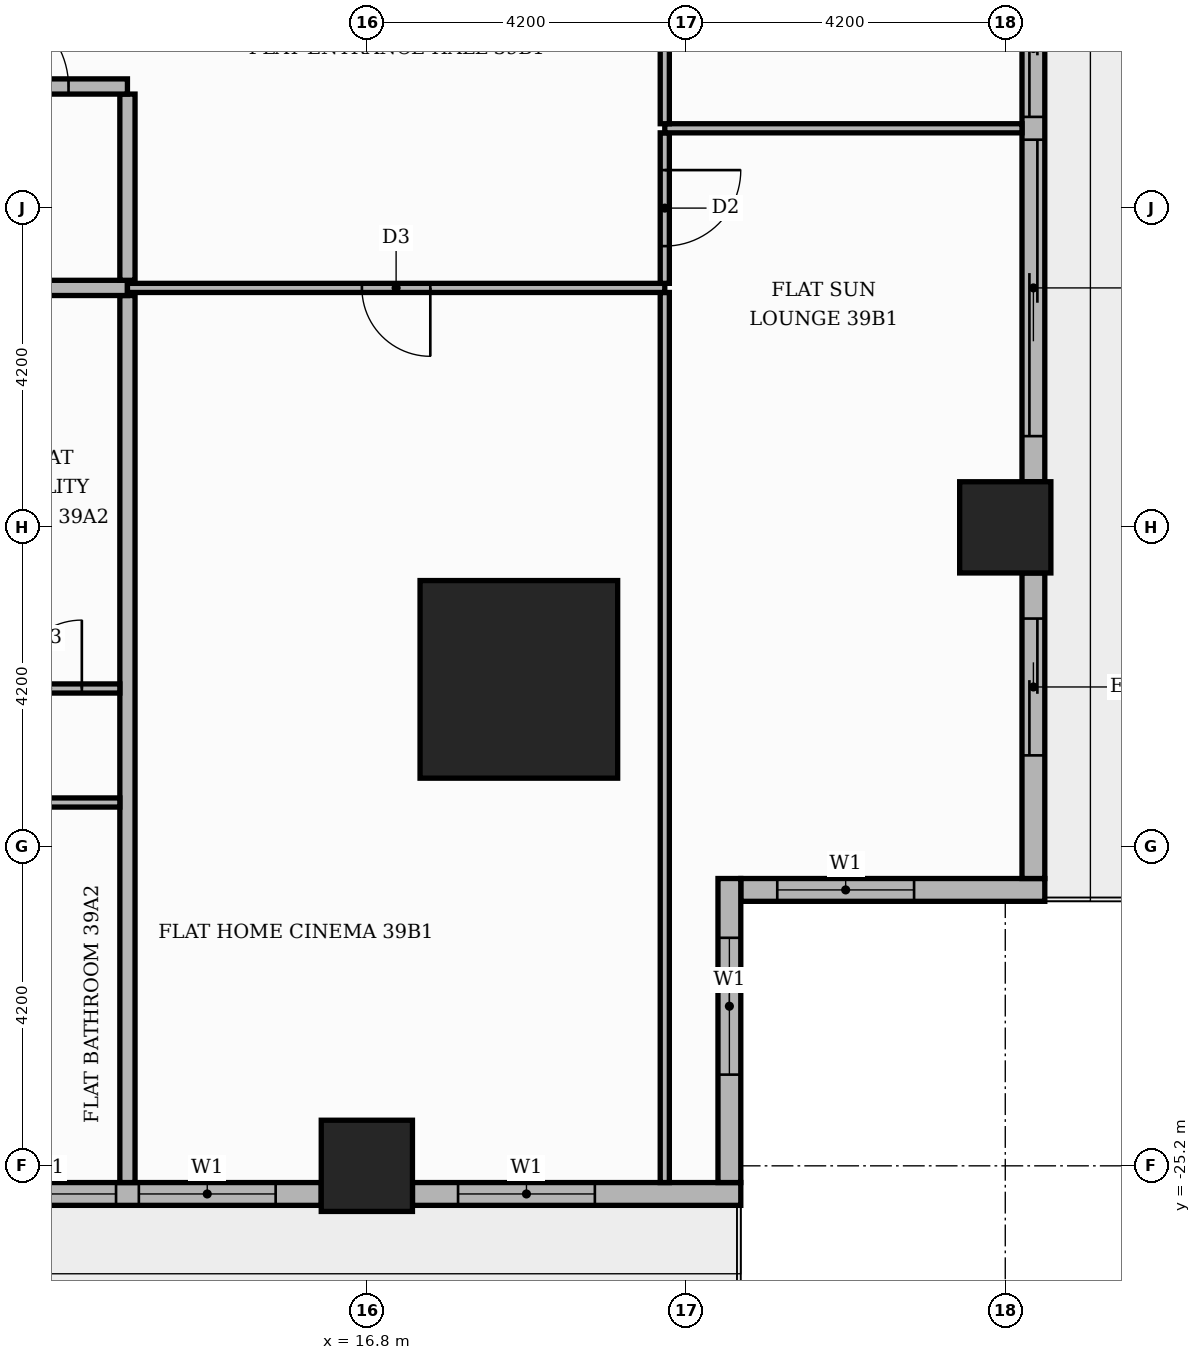
"""IFC4 building model, lengths in metres.
Left out: names, types, materials, properties, quantities, classifications, styles, units other than length and angle.
Written with IfcOpenShell. Run it as: python <this file> out.ifc"""

import sys

from ifc_helpers import new_model, si_unit, direction, frame, frame_2d, origin, origin_2d, place, context, subcontext, project, spatial, rectangle, extrude, element, fill, save


model = new_model("IFC4")
c1 = context("Model", 3, precision=1e-05, world=origin(), true_north=direction((0.0, 1.0)))
c2 = subcontext(c1, "Body", "Model", "MODEL_VIEW")
j1 = project(units=[si_unit("LENGTHUNIT", "METRE"), si_unit("PLANEANGLEUNIT", "RADIAN")], contexts=[c1])
p1 = place(None, origin())
s1 = spatial("IfcSite", under=j1, at=p1, CompositionType="ELEMENT")
p2 = place(p1, origin())
s2 = spatial("IfcBuilding", under=s1, at=p2, CompositionType="ELEMENT")
p3 = place(p2, frame((0.0, 0.0, 165.0)))
s3 = spatial("IfcBuildingStorey", under=s2, at=p3, CompositionType="ELEMENT", Elevation=165.0)
p4 = place(p3, frame((18.8, -18.8, 0.0), z_axis=(0.0, 0.0, 1.0), x_axis=(1.0, 0.0, 0.0)))
e1 = element("IfcColumn", 1, at=p4, inside=s3, PredefinedType="COLUMN", context=c2, shape_type="SweptSolid", body=[
    extrude(rectangle(XDim=2.6, YDim=2.6, at=origin_2d()), origin(), (0.0, 0.0, 1.0), 3.9),
])
for number, where, z_axis, x_axis in (
    (2, (25.2, -16.8, 0.0), (0.0, 0.0, 1.0), (1.0, 0.0, 0.0)),
    (3, (16.8, -25.2, 0.0), (0.0, 0.0, 1.0), (1.0, 0.0, 0.0)),
):
    element("IfcColumn", number, at=place(p3, frame(where, z_axis=z_axis, x_axis=x_axis)), inside=s3, PredefinedType="COLUMN", context=c2, shape_type="SweptSolid", body=[
        extrude(rectangle(XDim=1.2, YDim=1.2, at=origin_2d()), origin(), (0.0, 0.0, 1.0), 3.9),
    ])
p5 = place(p3, frame((21.72, -21.57, 0.0), z_axis=(0.0, 0.0, 1.0), x_axis=(1.0, 0.0, 0.0)))
e4 = element("IfcWall", 4, at=p5, inside=s3, PredefinedType="STANDARD", context=c2, shape_type="SweptSolid", body=[
    extrude(rectangle(XDim=4.0, YDim=0.3, at=frame_2d((2.0, 0.0))), origin(), (0.0, 0.0, 1.0), 3.48),
])
p6 = place(p5, frame((0.48, 0.0, 0.9)))
e5 = element("IfcOpeningElement", 5, at=p6, cuts=e4, PredefinedType="OPENING", context=c2, shape_type="SweptSolid", body=[
    extrude(rectangle(XDim=1.8, YDim=2.1, at=frame_2d((0.9, 1.05))), frame((0.0, 0.16, 0.0), z_axis=(0.0, -1.0, 0.0), x_axis=(1.0, 0.0, 0.0)), (0.0, 0.0, 1.0), 0.32),
])
p7 = place(p3, frame((25.57, -21.42, 0.0), z_axis=(0.0, 0.0, 1.0), x_axis=(0.0, 1.0, 0.0)))
e6 = element("IfcWall", 6, at=p7, inside=s3, PredefinedType="STANDARD", context=c2, shape_type="SweptSolid", body=[
    extrude(rectangle(XDim=4.02, YDim=0.3, at=frame_2d((2.01, 0.0))), origin(), (0.0, 0.0, 1.0), 3.48),
])
p8 = place(p7, frame((1.62, 0.0, 0.0)))
e7 = element("IfcOpeningElement", 7, at=p8, cuts=e6, PredefinedType="OPENING", context=c2, shape_type="SweptSolid", body=[
    extrude(rectangle(XDim=1.8, YDim=2.4, at=frame_2d((0.9, 1.2))), frame((0.0, 0.16, 0.0), z_axis=(0.0, -1.0, 0.0), x_axis=(1.0, 0.0, 0.0)), (0.0, 0.0, 1.0), 0.32),
])
p9 = place(p3, frame((25.57, -16.2, 0.0), z_axis=(0.0, 0.0, 1.0), x_axis=(0.0, 1.0, 0.0)))
e8 = element("IfcWall", 8, at=p9, inside=s3, PredefinedType="STANDARD", context=c2, shape_type="SweptSolid", body=[
    extrude(rectangle(XDim=7.2, YDim=0.3, at=frame_2d((3.6, 0.0))), origin(), (0.0, 0.0, 1.0), 3.48),
])
p10 = place(p9, frame((0.6, 0.0, 0.0)))
e9 = element("IfcOpeningElement", 9, at=p10, cuts=e8, PredefinedType="OPENING", context=c2, shape_type="SweptSolid", body=[
    extrude(rectangle(XDim=3.9, YDim=2.4, at=frame_2d((1.95, 1.2))), frame((0.0, 0.16, 0.0), z_axis=(0.0, -1.0, 0.0), x_axis=(1.0, 0.0, 0.0)), (0.0, 0.0, 1.0), 0.32),
])
p11 = place(p9, frame((4.8, 0.0, 0.0)))
e10 = element("IfcOpeningElement", 10, at=p11, cuts=e8, PredefinedType="OPENING", context=c2, shape_type="SweptSolid", body=[
    extrude(rectangle(XDim=1.8, YDim=2.4, at=frame_2d((0.9, 1.2))), frame((0.0, 0.16, 0.0), z_axis=(0.0, -1.0, 0.0), x_axis=(1.0, 0.0, 0.0)), (0.0, 0.0, 1.0), 0.32),
])
p12 = place(p3, frame((9.0, -25.57, 0.0), z_axis=(0.0, 0.0, 1.0), x_axis=(1.0, 0.0, 0.0)))
e11 = element("IfcWall", 11, at=p12, inside=s3, PredefinedType="STANDARD", context=c2, shape_type="SweptSolid", body=[
    extrude(rectangle(XDim=7.2, YDim=0.3, at=frame_2d((3.6, 0.0))), origin(), (0.0, 0.0, 1.0), 3.48),
])
p13 = place(p12, frame((0.6, 0.0, 0.9)))
e12 = element("IfcOpeningElement", 12, at=p13, cuts=e11, PredefinedType="OPENING", context=c2, shape_type="SweptSolid", body=[
    extrude(rectangle(XDim=1.8, YDim=2.1, at=frame_2d((0.9, 1.05))), frame((0.0, 0.16, 0.0), z_axis=(0.0, -1.0, 0.0), x_axis=(1.0, 0.0, 0.0)), (0.0, 0.0, 1.0), 0.32),
])
p14 = place(p12, frame((2.7, 0.0, 0.9)))
e13 = element("IfcOpeningElement", 13, at=p14, cuts=e11, PredefinedType="OPENING", context=c2, shape_type="SweptSolid", body=[
    extrude(rectangle(XDim=1.8, YDim=2.1, at=frame_2d((0.9, 1.05))), frame((0.0, 0.16, 0.0), z_axis=(0.0, -1.0, 0.0), x_axis=(1.0, 0.0, 0.0)), (0.0, 0.0, 1.0), 0.32),
])
p15 = place(p12, frame((4.8, 0.0, 0.9)))
e14 = element("IfcOpeningElement", 14, at=p15, cuts=e11, PredefinedType="OPENING", context=c2, shape_type="SweptSolid", body=[
    extrude(rectangle(XDim=1.8, YDim=2.1, at=frame_2d((0.9, 1.05))), frame((0.0, 0.16, 0.0), z_axis=(0.0, -1.0, 0.0), x_axis=(1.0, 0.0, 0.0)), (0.0, 0.0, 1.0), 0.32),
])
p16 = place(p3, frame((17.4, -25.57, 0.0), z_axis=(0.0, 0.0, 1.0), x_axis=(1.0, 0.0, 0.0)))
e15 = element("IfcWall", 15, at=p16, inside=s3, PredefinedType="STANDARD", context=c2, shape_type="SweptSolid", body=[
    extrude(rectangle(XDim=4.32, YDim=0.3, at=frame_2d((2.16, 0.0))), origin(), (0.0, 0.0, 1.0), 3.48),
])
p17 = place(p16, frame((0.6, 0.0, 0.9)))
e16 = element("IfcOpeningElement", 16, at=p17, cuts=e15, PredefinedType="OPENING", context=c2, shape_type="SweptSolid", body=[
    extrude(rectangle(XDim=1.8, YDim=2.1, at=frame_2d((0.9, 1.05))), frame((0.0, 0.16, 0.0), z_axis=(0.0, -1.0, 0.0), x_axis=(1.0, 0.0, 0.0)), (0.0, 0.0, 1.0), 0.32),
])
p18 = place(p3, frame((21.57, -25.42, 0.0), z_axis=(0.0, 0.0, 1.0), x_axis=(0.0, 1.0, 0.0)))
e17 = element("IfcWall", 17, at=p18, inside=s3, PredefinedType="STANDARD", context=c2, shape_type="SweptSolid", body=[
    extrude(rectangle(XDim=4.0, YDim=0.3, at=frame_2d((2.0, 0.0))), origin(), (0.0, 0.0, 1.0), 3.48),
])
p19 = place(p18, frame((1.42, 0.0, 0.9)))
e18 = element("IfcOpeningElement", 18, at=p19, cuts=e17, PredefinedType="OPENING", context=c2, shape_type="SweptSolid", body=[
    extrude(rectangle(XDim=1.8, YDim=2.1, at=frame_2d((0.9, 1.05))), frame((0.0, 0.16, 0.0), z_axis=(0.0, -1.0, 0.0), x_axis=(1.0, 0.0, 0.0)), (0.0, 0.0, 1.0), 0.32),
])
p20 = place(p3, frame((13.65, -25.42, 0.0), z_axis=(0.0, 0.0, 1.0), x_axis=(0.0, 1.0, 0.0)))
e19 = element("IfcWall", 19, at=p20, inside=s3, PredefinedType="PARTITIONING", context=c2, shape_type="SweptSolid", body=[
    extrude(rectangle(XDim=11.67, YDim=0.2, at=frame_2d((5.835, 0.0))), origin(), (0.0, 0.0, 1.0), 3.48),
])
p21 = place(p3, frame((20.72, -25.42, 0.0), z_axis=(0.0, 0.0, 1.0), x_axis=(0.0, 1.0, 0.0)))
e20 = element("IfcWall", 20, at=p21, inside=s3, PredefinedType="PARTITIONING", context=c2, shape_type="SweptSolid", body=[
    extrude(rectangle(XDim=11.71, YDim=0.12, at=frame_2d((5.855, 0.0))), origin(), (0.0, 0.0, 1.0), 3.48),
])
p22 = place(p3, frame((-5.15, -20.42, 0.0), z_axis=(0.0, 0.0, 1.0), x_axis=(1.0, 0.0, 0.0)))
e21 = element("IfcWall", 21, at=p22, inside=s3, PredefinedType="PARTITIONING", context=c2, shape_type="SweptSolid", body=[
    extrude(rectangle(XDim=18.7, YDim=0.12, at=frame_2d((9.35, 0.0))), origin(), (0.0, 0.0, 1.0), 3.48),
])
p23 = place(p22, frame((1.5, 0.0, 0.0)))
e22 = element("IfcOpeningElement", 22, at=p23, cuts=e21, PredefinedType="OPENING", context=c2, shape_type="SweptSolid", body=[
    extrude(rectangle(XDim=1.0, YDim=2.1, at=frame_2d((0.5, 1.05))), frame((0.0, 0.07, 0.0), z_axis=(0.0, -1.0, 0.0), x_axis=(1.0, 0.0, 0.0)), (0.0, 0.0, 1.0), 0.14),
])
p24 = place(p22, frame((5.75, 0.0, 0.0)))
e23 = element("IfcOpeningElement", 23, at=p24, cuts=e21, PredefinedType="OPENING", context=c2, shape_type="SweptSolid", body=[
    extrude(rectangle(XDim=0.9, YDim=2.1, at=frame_2d((0.45, 1.05))), frame((0.0, 0.07, 0.0), z_axis=(0.0, -1.0, 0.0), x_axis=(1.0, 0.0, 0.0)), (0.0, 0.0, 1.0), 0.14),
])
p25 = place(p22, frame((14.15, 0.0, 0.0)))
e24 = element("IfcOpeningElement", 24, at=p25, cuts=e21, PredefinedType="OPENING", context=c2, shape_type="SweptSolid", body=[
    extrude(rectangle(XDim=0.9, YDim=2.1, at=frame_2d((0.45, 1.05))), frame((0.0, 0.07, 0.0), z_axis=(0.0, -1.0, 0.0), x_axis=(1.0, 0.0, 0.0)), (0.0, 0.0, 1.0), 0.14),
])
p26 = place(p3, frame((-1.05, -18.92, 0.0), z_axis=(0.0, 0.0, 1.0), x_axis=(1.0, 0.0, 0.0)))
e25 = element("IfcWall", 25, at=p26, inside=s3, PredefinedType="PARTITIONING", context=c2, shape_type="SweptSolid", body=[
    extrude(rectangle(XDim=14.6, YDim=0.12, at=frame_2d((7.3, 0.0))), origin(), (0.0, 0.0, 1.0), 3.48),
])
p27 = place(p26, frame((2.7, 0.0, 0.0)))
e26 = element("IfcOpeningElement", 26, at=p27, cuts=e25, PredefinedType="OPENING", context=c2, shape_type="SweptSolid", body=[
    extrude(rectangle(XDim=0.9, YDim=2.1, at=frame_2d((0.45, 1.05))), frame((0.0, 0.07, 0.0), z_axis=(0.0, -1.0, 0.0), x_axis=(1.0, 0.0, 0.0)), (0.0, 0.0, 1.0), 0.14),
])
p28 = place(p26, frame((7.05, 0.0, 0.0)))
e27 = element("IfcOpeningElement", 27, at=p28, cuts=e25, PredefinedType="OPENING", context=c2, shape_type="SweptSolid", body=[
    extrude(rectangle(XDim=0.9, YDim=2.1, at=frame_2d((0.45, 1.05))), frame((0.0, 0.07, 0.0), z_axis=(0.0, -1.0, 0.0), x_axis=(1.0, 0.0, 0.0)), (0.0, 0.0, 1.0), 0.14),
])
p29 = place(p26, frame((10.2, 0.0, 0.0)))
e28 = element("IfcOpeningElement", 28, at=p29, cuts=e25, PredefinedType="OPENING", context=c2, shape_type="SweptSolid", body=[
    extrude(rectangle(XDim=0.9, YDim=2.1, at=frame_2d((0.45, 1.05))), frame((0.0, 0.07, 0.0), z_axis=(0.0, -1.0, 0.0), x_axis=(1.0, 0.0, 0.0)), (0.0, 0.0, 1.0), 0.14),
])
p30 = place(p26, frame((13.2, 0.0, 0.0)))
e29 = element("IfcOpeningElement", 29, at=p30, cuts=e25, PredefinedType="OPENING", context=c2, shape_type="SweptSolid", body=[
    extrude(rectangle(XDim=0.9, YDim=2.1, at=frame_2d((0.45, 1.05))), frame((0.0, 0.07, 0.0), z_axis=(0.0, -1.0, 0.0), x_axis=(1.0, 0.0, 0.0)), (0.0, 0.0, 1.0), 0.14),
])
p31 = place(p3, frame((-25.42, -13.65, 0.0), z_axis=(0.0, 0.0, 1.0), x_axis=(1.0, 0.0, 0.0)))
e30 = element("IfcWall", 30, at=p31, inside=s3, PredefinedType="PARTITIONING", context=c2, shape_type="SweptSolid", body=[
    extrude(rectangle(XDim=39.07, YDim=0.2, at=frame_2d((19.535, 0.0))), origin(), (0.0, 0.0, 1.0), 3.48),
])
p32 = place(p31, frame((13.32, 0.0, 0.0)))
e31 = element("IfcOpeningElement", 31, at=p32, cuts=e30, PredefinedType="OPENING", context=c2, shape_type="SweptSolid", body=[
    extrude(rectangle(XDim=1.1, YDim=2.4, at=frame_2d((0.55, 1.2))), frame((0.0, 0.11, 0.0), z_axis=(0.0, -1.0, 0.0), x_axis=(1.0, 0.0, 0.0)), (0.0, 0.0, 1.0), 0.22),
])
p33 = place(p31, frame((21.72, 0.0, 0.0)))
e32 = element("IfcOpeningElement", 32, at=p33, cuts=e30, PredefinedType="OPENING", context=c2, shape_type="SweptSolid", body=[
    extrude(rectangle(XDim=1.1, YDim=2.4, at=frame_2d((0.55, 1.2))), frame((0.0, 0.11, 0.0), z_axis=(0.0, -1.0, 0.0), x_axis=(1.0, 0.0, 0.0)), (0.0, 0.0, 1.0), 0.22),
])
p34 = place(p3, frame((13.65, -13.65, 0.0), z_axis=(0.0, 0.0, 1.0), x_axis=(1.0, 0.0, 0.0)))
e33 = element("IfcWall", 33, at=p34, inside=s3, PredefinedType="PARTITIONING", context=c2, shape_type="SweptSolid", body=[
    extrude(rectangle(XDim=7.07, YDim=0.12, at=frame_2d((3.535, 0.0))), origin(), (0.0, 0.0, 1.0), 3.48),
])
p35 = place(p34, frame((3.085, 0.0, 0.0)))
e34 = element("IfcOpeningElement", 34, at=p35, cuts=e33, PredefinedType="OPENING", context=c2, shape_type="SweptSolid", body=[
    extrude(rectangle(XDim=0.9, YDim=2.1, at=frame_2d((0.45, 1.05))), frame((0.0, 0.07, 0.0), z_axis=(0.0, -1.0, 0.0), x_axis=(1.0, 0.0, 0.0)), (0.0, 0.0, 1.0), 0.14),
])
p36 = place(p3, frame((20.72, -13.59, 0.0), z_axis=(0.0, 0.0, 1.0), x_axis=(0.0, 1.0, 0.0)))
e35 = element("IfcWall", 35, at=p36, inside=s3, PredefinedType="PARTITIONING", context=c2, shape_type="SweptSolid", body=[
    extrude(rectangle(XDim=1.98, YDim=0.12, at=frame_2d((0.99, 0.0))), origin(), (0.0, 0.0, 1.0), 3.48),
])
p37 = place(p36, frame((0.49, 0.0, 0.0)))
e36 = element("IfcOpeningElement", 36, at=p37, cuts=e35, PredefinedType="OPENING", context=c2, shape_type="SweptSolid", body=[
    extrude(rectangle(XDim=1.0, YDim=2.1, at=frame_2d((0.5, 1.05))), frame((0.0, 0.07, 0.0), z_axis=(0.0, -1.0, 0.0), x_axis=(1.0, 0.0, 0.0)), (0.0, 0.0, 1.0), 0.14),
])
p38 = place(p3, frame((13.65, -13.55, 0.0), z_axis=(0.0, 0.0, 1.0), x_axis=(0.0, 1.0, 0.0)))
e37 = element("IfcWall", 37, at=p38, inside=s3, PredefinedType="PARTITIONING", context=c2, shape_type="SweptSolid", body=[
    extrude(rectangle(XDim=2.45, YDim=0.2, at=frame_2d((1.225, 0.0))), origin(), (0.0, 0.0, 1.0), 3.48),
])
p39 = place(p3, frame((20.72, -11.55, 0.0), z_axis=(0.0, 0.0, 1.0), x_axis=(1.0, 0.0, 0.0)))
e38 = element("IfcWall", 38, at=p39, inside=s3, PredefinedType="PARTITIONING", context=c2, shape_type="SweptSolid", body=[
    extrude(rectangle(XDim=4.7, YDim=0.12, at=frame_2d((2.35, 0.0))), origin(), (0.0, 0.0, 1.0), 3.48),
])
p40 = place(p3, frame((20.72, -11.49, 0.0), z_axis=(0.0, 0.0, 1.0), x_axis=(0.0, 1.0, 0.0)))
e39 = element("IfcWall", 39, at=p40, inside=s3, PredefinedType="PARTITIONING", context=c2, shape_type="SweptSolid", body=[
    extrude(rectangle(XDim=8.28, YDim=0.12, at=frame_2d((4.14, 0.0))), origin(), (0.0, 0.0, 1.0), 3.48),
])
p41 = place(p40, frame((3.64, 0.0, 0.0)))
e40 = element("IfcOpeningElement", 40, at=p41, cuts=e39, PredefinedType="OPENING", context=c2, shape_type="SweptSolid", body=[
    extrude(rectangle(XDim=1.0, YDim=2.1, at=frame_2d((0.5, 1.05))), frame((0.0, 0.07, 0.0), z_axis=(0.0, -1.0, 0.0), x_axis=(1.0, 0.0, 0.0)), (0.0, 0.0, 1.0), 0.14),
])
p42 = place(p3, frame((11.0, -11.0, 0.0), z_axis=(0.0, 0.0, 1.0), x_axis=(1.0, 0.0, 0.0)))
e41 = element("IfcWall", 41, at=p42, inside=s3, PredefinedType="PARTITIONING", context=c2, shape_type="SweptSolid", body=[
    extrude(rectangle(XDim=2.65, YDim=0.2, at=frame_2d((1.325, 0.0))), origin(), (0.0, 0.0, 1.0), 3.48),
])
p43 = place(p42, frame((0.775, 0.0, 0.0)))
e42 = element("IfcOpeningElement", 42, at=p43, cuts=e41, PredefinedType="OPENING", context=c2, shape_type="SweptSolid", body=[
    extrude(rectangle(XDim=1.1, YDim=2.4, at=frame_2d((0.55, 1.2))), frame((0.0, 0.11, 0.0), z_axis=(0.0, -1.0, 0.0), x_axis=(1.0, 0.0, 0.0)), (0.0, 0.0, 1.0), 0.22),
])
p44 = place(p6, origin())
e43 = element("IfcWindow", 43, at=p44, inside=s3, PartitioningType="SINGLE_PANEL", PredefinedType="WINDOW", context=c2, shape_type="SweptSolid", body=[
    extrude(rectangle(XDim=1.8, YDim=2.1, at=frame_2d((0.9, 1.05))), frame((0.0, 0.03, 0.0), z_axis=(0.0, -1.0, 0.0), x_axis=(1.0, 0.0, 0.0)), (0.0, 0.0, 1.0), 0.06),
])
fill(e5, e43)
p45 = place(p8, origin())
e44 = element("IfcDoor", 44, at=p45, inside=s3, OperationType="SLIDING_TO_RIGHT", PredefinedType="DOOR", context=c2, shape_type="SweptSolid", body=[
    extrude(rectangle(XDim=1.8, YDim=2.4, at=frame_2d((0.9, 1.2))), frame((0.0, 0.025, 0.0), z_axis=(0.0, -1.0, 0.0), x_axis=(1.0, 0.0, 0.0)), (0.0, 0.0, 1.0), 0.05),
])
fill(e7, e44)
p46 = place(p10, origin())
e45 = element("IfcDoor", 45, at=p46, inside=s3, OperationType="SLIDING_TO_LEFT", PredefinedType="DOOR", context=c2, shape_type="SweptSolid", body=[
    extrude(rectangle(XDim=3.9, YDim=2.4, at=frame_2d((1.95, 1.2))), frame((0.0, 0.025, 0.0), z_axis=(0.0, -1.0, 0.0), x_axis=(1.0, 0.0, 0.0)), (0.0, 0.0, 1.0), 0.05),
])
fill(e9, e45)
p47 = place(p11, origin())
e46 = element("IfcDoor", 46, at=p47, inside=s3, OperationType="SLIDING_TO_RIGHT", PredefinedType="DOOR", context=c2, shape_type="SweptSolid", body=[
    extrude(rectangle(XDim=1.8, YDim=2.4, at=frame_2d((0.9, 1.2))), frame((0.0, 0.025, 0.0), z_axis=(0.0, -1.0, 0.0), x_axis=(1.0, 0.0, 0.0)), (0.0, 0.0, 1.0), 0.05),
])
fill(e10, e46)
p48 = place(p14, origin())
e47 = element("IfcWindow", 47, at=p48, inside=s3, PartitioningType="SINGLE_PANEL", PredefinedType="WINDOW", context=c2, shape_type="SweptSolid", body=[
    extrude(rectangle(XDim=1.8, YDim=2.1, at=frame_2d((0.9, 1.05))), frame((0.0, 0.03, 0.0), z_axis=(0.0, -1.0, 0.0), x_axis=(1.0, 0.0, 0.0)), (0.0, 0.0, 1.0), 0.06),
])
fill(e13, e47)
p49 = place(p15, origin())
e48 = element("IfcWindow", 48, at=p49, inside=s3, PartitioningType="SINGLE_PANEL", PredefinedType="WINDOW", context=c2, shape_type="SweptSolid", body=[
    extrude(rectangle(XDim=1.8, YDim=2.1, at=frame_2d((0.9, 1.05))), frame((0.0, 0.03, 0.0), z_axis=(0.0, -1.0, 0.0), x_axis=(1.0, 0.0, 0.0)), (0.0, 0.0, 1.0), 0.06),
])
fill(e14, e48)
p50 = place(p17, origin())
e49 = element("IfcWindow", 49, at=p50, inside=s3, PartitioningType="SINGLE_PANEL", PredefinedType="WINDOW", context=c2, shape_type="SweptSolid", body=[
    extrude(rectangle(XDim=1.8, YDim=2.1, at=frame_2d((0.9, 1.05))), frame((0.0, 0.03, 0.0), z_axis=(0.0, -1.0, 0.0), x_axis=(1.0, 0.0, 0.0)), (0.0, 0.0, 1.0), 0.06),
])
fill(e16, e49)
p51 = place(p19, origin())
e50 = element("IfcWindow", 50, at=p51, inside=s3, PartitioningType="SINGLE_PANEL", PredefinedType="WINDOW", context=c2, shape_type="SweptSolid", body=[
    extrude(rectangle(XDim=1.8, YDim=2.1, at=frame_2d((0.9, 1.05))), frame((0.0, 0.03, 0.0), z_axis=(0.0, -1.0, 0.0), x_axis=(1.0, 0.0, 0.0)), (0.0, 0.0, 1.0), 0.06),
])
fill(e18, e50)
p52 = place(p30, origin())
e51 = element("IfcDoor", 51, at=p52, inside=s3, OperationType="SINGLE_SWING_RIGHT", PredefinedType="DOOR", context=c2, shape_type="SweptSolid", body=[
    extrude(rectangle(XDim=0.9, YDim=2.1, at=frame_2d((0.45, 1.05))), frame((0.0, 0.025, 0.0), z_axis=(0.0, -1.0, 0.0), x_axis=(1.0, 0.0, 0.0)), (0.0, 0.0, 1.0), 0.05),
])
fill(e29, e51)
p53 = place(p43, origin())
e52 = element("IfcDoor", 52, at=p53, inside=s3, OperationType="SINGLE_SWING_LEFT", PredefinedType="DOOR", context=c2, shape_type="SweptSolid", body=[
    extrude(rectangle(XDim=1.1, YDim=2.4, at=frame_2d((0.55, 1.2))), frame((0.0, 0.025, 0.0), z_axis=(0.0, -1.0, 0.0), x_axis=(1.0, 0.0, 0.0)), (0.0, 0.0, 1.0), 0.05),
])
fill(e42, e52)
p54 = place(p35, frame((0.9, 0.0, 0.0), z_axis=(0.0, 0.0, 1.0), x_axis=(-1.0, 0.0, 0.0)))
e53 = element("IfcDoor", 53, at=p54, inside=s3, OperationType="SINGLE_SWING_RIGHT", PredefinedType="DOOR", context=c2, shape_type="SweptSolid", body=[
    extrude(rectangle(XDim=0.9, YDim=2.1, at=frame_2d((0.45, 1.05))), frame((0.0, 0.025, 0.0), z_axis=(0.0, -1.0, 0.0), x_axis=(1.0, 0.0, 0.0)), (0.0, 0.0, 1.0), 0.05),
])
fill(e34, e53)
p55 = place(p37, frame((1.0, 0.0, 0.0), z_axis=(0.0, 0.0, 1.0), x_axis=(-1.0, 0.0, 0.0)))
e54 = element("IfcDoor", 54, at=p55, inside=s3, OperationType="SINGLE_SWING_RIGHT", PredefinedType="DOOR", context=c2, shape_type="SweptSolid", body=[
    extrude(rectangle(XDim=1.0, YDim=2.1, at=frame_2d((0.5, 1.05))), frame((0.0, 0.025, 0.0), z_axis=(0.0, -1.0, 0.0), x_axis=(1.0, 0.0, 0.0)), (0.0, 0.0, 1.0), 0.05),
])
fill(e36, e54)
save(model, sys.argv[1])
